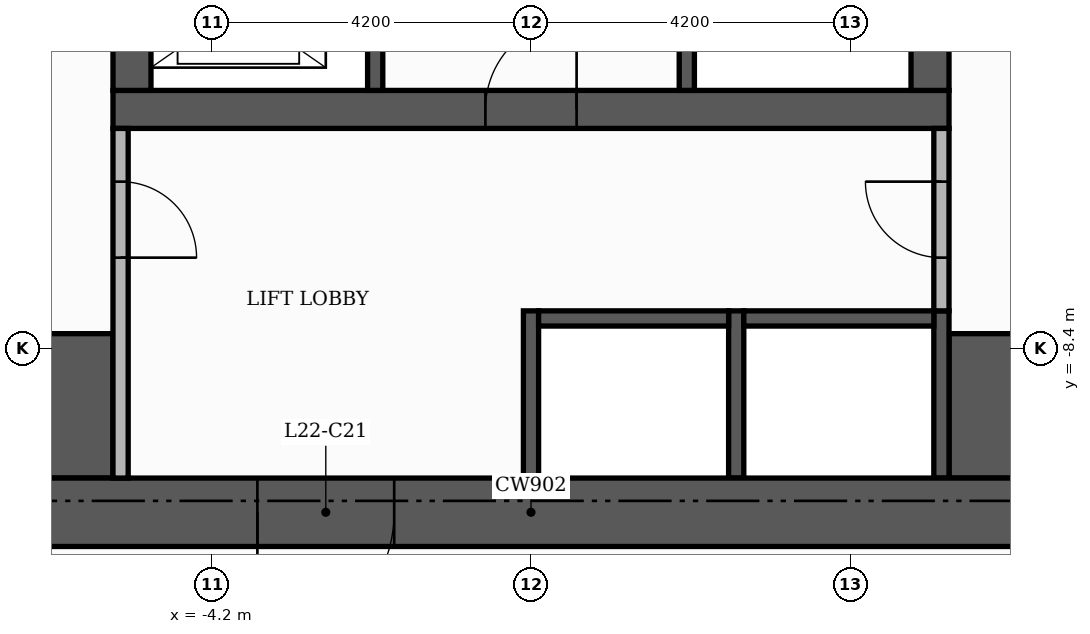
"""IFC4 building model, lengths in metres.
Left out: names, types, materials, properties, quantities, classifications, styles, units other than length and angle.
Written with IfcOpenShell. Run it as: python <this file> out.ifc"""

import sys

from ifc_helpers import new_model, si_unit, direction, frame, frame_2d, origin, place, context, subcontext, project, spatial, rectangle, extrude, element, fill, save


model = new_model("IFC4")
c1 = context("Model", 3, precision=1e-05, world=origin(), true_north=direction((0.0, 1.0)))
c2 = subcontext(c1, "Body", "Model", "MODEL_VIEW")
j1 = project(units=[si_unit("LENGTHUNIT", "METRE"), si_unit("PLANEANGLEUNIT", "RADIAN")], contexts=[c1])
p1 = place(None, origin())
s1 = spatial("IfcSite", under=j1, at=p1, CompositionType="ELEMENT")
p2 = place(p1, origin())
s2 = spatial("IfcBuilding", under=s1, at=p2, CompositionType="ELEMENT")
p3 = place(p2, frame((0.0, 0.0, 94.8)))
s3 = spatial("IfcBuildingStorey", under=s2, at=p3, CompositionType="ELEMENT", Elevation=94.8)
p4 = place(p3, frame((-5.5, -5.25, 0.0), z_axis=(0.0, 0.0, 1.0), x_axis=(1.0, 0.0, 0.0)))
e1 = element("IfcWall", 1, at=p4, inside=s3, PredefinedType="SHEAR", context=c2, shape_type="SweptSolid", body=[
    extrude(rectangle(XDim=11.0, YDim=0.5, at=frame_2d((5.5, 0.0))), origin(), (0.0, 0.0, 1.0), 3.48),
])
p5 = place(p4, frame((4.9, 0.0, 0.0)))
e2 = element("IfcOpeningElement", 2, at=p5, cuts=e1, PredefinedType="OPENING", context=c2, shape_type="SweptSolid", body=[
    extrude(rectangle(XDim=1.2, YDim=2.1, at=frame_2d((0.6, 1.05))), frame((0.0, 0.26, 0.0), z_axis=(0.0, -1.0, 0.0), x_axis=(1.0, 0.0, 0.0)), (0.0, 0.0, 1.0), 0.52),
])
for number, where, z_axis, x_axis in (
    (3, (-5.25, -5.0, 0.0), (0.0, 0.0, 1.0), (0.0, 1.0, 0.0)),
    (4, (5.25, -5.0, 0.0), (0.0, 0.0, 1.0), (0.0, 1.0, 0.0)),
):
    element("IfcWall", number, at=place(p3, frame(where, z_axis=z_axis, x_axis=x_axis)), inside=s3, PredefinedType="SHEAR", context=c2, shape_type="SweptSolid", body=[
        extrude(rectangle(XDim=10.5, YDim=0.5, at=frame_2d((5.25, 0.0))), origin(), (0.0, 0.0, 1.0), 3.48),
    ])
for number, where, z_axis, x_axis in (
    (5, (-10.1, -9.15, 0.0), (0.0, 0.0, 1.0), (1.0, 0.0, 0.0)),
    (6, (5.5, -9.15, 0.0), (0.0, 0.0, 1.0), (1.0, 0.0, 0.0)),
):
    element("IfcWall", number, at=place(p3, frame(where, z_axis=z_axis, x_axis=x_axis)), inside=s3, PredefinedType="SHEAR", context=c2, shape_type="SweptSolid", body=[
        extrude(rectangle(XDim=4.6, YDim=1.9, at=frame_2d((2.3, 0.0))), origin(), (0.0, 0.0, 1.0), 3.48),
    ])
p6 = place(p3, frame((2.05, -5.0, 0.0), z_axis=(0.0, 0.0, 1.0), x_axis=(0.0, 1.0, 0.0)))
e7 = element("IfcWall", 7, at=p6, inside=s3, PredefinedType="SHEAR", context=c2, shape_type="SweptSolid", body=[
    extrude(rectangle(XDim=6.6, YDim=0.2, at=frame_2d((3.3, 0.0))), origin(), (0.0, 0.0, 1.0), 3.48),
])
p7 = place(p6, frame((5.25, 0.0, 0.0)))
e8 = element("IfcOpeningElement", 8, at=p7, cuts=e7, PredefinedType="OPENING", context=c2, shape_type="SweptSolid", body=[
    extrude(rectangle(XDim=1.0, YDim=2.1, at=frame_2d((0.5, 1.05))), frame((0.0, 0.11, 0.0), z_axis=(0.0, -1.0, 0.0), x_axis=(1.0, 0.0, 0.0)), (0.0, 0.0, 1.0), 0.22),
])
for number, where, z_axis, x_axis in (
    (9, (0.0, -10.1, 0.0), (0.0, 0.0, 1.0), (0.0, 1.0, 0.0)),
    (10, (2.7, -10.1, 0.0), (0.0, 0.0, 1.0), (0.0, 1.0, 0.0)),
    (11, (5.4, -10.1, 0.0), (0.0, 0.0, 1.0), (0.0, 1.0, 0.0)),
):
    element("IfcWall", number, at=place(p3, frame(where, z_axis=z_axis, x_axis=x_axis)), inside=s3, PredefinedType="SHEAR", context=c2, shape_type="SweptSolid", body=[
        extrude(rectangle(XDim=2.2, YDim=0.2, at=frame_2d((1.1, 0.0))), origin(), (0.0, 0.0, 1.0), 3.48),
    ])
for number, where, z_axis, x_axis in (
    (12, (0.1, -8.0, 0.0), (0.0, 0.0, 1.0), (1.0, 0.0, 0.0)),
    (13, (2.8, -8.0, 0.0), (0.0, 0.0, 1.0), (1.0, 0.0, 0.0)),
):
    element("IfcWall", number, at=place(p3, frame(where, z_axis=z_axis, x_axis=x_axis)), inside=s3, PredefinedType="SHEAR", context=c2, shape_type="SweptSolid", body=[
        extrude(rectangle(XDim=2.5, YDim=0.2, at=frame_2d((1.25, 0.0))), origin(), (0.0, 0.0, 1.0), 3.48),
    ])
p8 = place(p3, frame((-2.05, -5.0, 0.0), z_axis=(0.0, 0.0, 1.0), x_axis=(0.0, 1.0, 0.0)))
e14 = element("IfcWall", 14, at=p8, inside=s3, PredefinedType="SHEAR", context=c2, shape_type="SweptSolid", body=[
    extrude(rectangle(XDim=3.4, YDim=0.2, at=frame_2d((1.7, 0.0))), origin(), (0.0, 0.0, 1.0), 3.48),
])
p9 = place(p8, frame((0.55, 0.0, 0.0)))
e15 = element("IfcOpeningElement", 15, at=p9, cuts=e14, PredefinedType="OPENING", context=c2, shape_type="SweptSolid", body=[
    extrude(rectangle(XDim=1.1, YDim=2.1, at=frame_2d((0.55, 1.05))), frame((0.0, 0.11, 0.0), z_axis=(0.0, -1.0, 0.0), x_axis=(1.0, 0.0, 0.0)), (0.0, 0.0, 1.0), 0.22),
])
p10 = place(p8, frame((2.45, 0.0, 0.0)))
e16 = element("IfcOpeningElement", 16, at=p10, cuts=e14, PredefinedType="OPENING", context=c2, shape_type="SweptSolid", body=[
    extrude(rectangle(XDim=0.8, YDim=2.1, at=frame_2d((0.4, 1.05))), frame((0.0, 0.11, 0.0), z_axis=(0.0, -1.0, 0.0), x_axis=(1.0, 0.0, 0.0)), (0.0, 0.0, 1.0), 0.22),
])
p11 = place(p3, frame((-11.0, -10.55, 0.0), z_axis=(0.0, 0.0, 1.0), x_axis=(1.0, 0.0, 0.0)))
e17 = element("IfcWall", 17, at=p11, inside=s3, PredefinedType="SHEAR", context=c2, shape_type="SweptSolid", body=[
    extrude(rectangle(XDim=22.0, YDim=0.9, at=frame_2d((11.0, 0.0))), origin(), (0.0, 0.0, 1.0), 3.48),
])
p12 = place(p11, frame((7.4, 0.0, 0.0)))
e18 = element("IfcOpeningElement", 18, at=p12, cuts=e17, PredefinedType="OPENING", context=c2, shape_type="SweptSolid", body=[
    extrude(rectangle(XDim=1.8, YDim=2.2, at=frame_2d((0.9, 1.1))), frame((0.0, 0.46, 0.0), z_axis=(0.0, -1.0, 0.0), x_axis=(1.0, 0.0, 0.0)), (0.0, 0.0, 1.0), 0.92),
])
p13 = place(p3, frame((-5.4, -10.1, 0.0), z_axis=(0.0, 0.0, 1.0), x_axis=(0.0, 1.0, 0.0)))
e19 = element("IfcWall", 19, at=p13, inside=s3, PredefinedType="PARTITIONING", context=c2, shape_type="SweptSolid", body=[
    extrude(rectangle(XDim=4.6, YDim=0.2, at=frame_2d((2.3, 0.0))), origin(), (0.0, 0.0, 1.0), 3.48),
])
p14 = place(p13, frame((2.9, 0.0, 0.0)))
e20 = element("IfcOpeningElement", 20, at=p14, cuts=e19, PredefinedType="OPENING", context=c2, shape_type="SweptSolid", body=[
    extrude(rectangle(XDim=1.0, YDim=2.1, at=frame_2d((0.5, 1.05))), frame((0.0, 0.11, 0.0), z_axis=(0.0, -1.0, 0.0), x_axis=(1.0, 0.0, 0.0)), (0.0, 0.0, 1.0), 0.22),
])
p15 = place(p3, frame((5.4, -7.9, 0.0), z_axis=(0.0, 0.0, 1.0), x_axis=(0.0, 1.0, 0.0)))
e21 = element("IfcWall", 21, at=p15, inside=s3, PredefinedType="PARTITIONING", context=c2, shape_type="SweptSolid", body=[
    extrude(rectangle(XDim=2.4, YDim=0.2, at=frame_2d((1.2, 0.0))), origin(), (0.0, 0.0, 1.0), 3.48),
])
p16 = place(p15, frame((0.7, 0.0, 0.0)))
e22 = element("IfcOpeningElement", 22, at=p16, cuts=e21, PredefinedType="OPENING", context=c2, shape_type="SweptSolid", body=[
    extrude(rectangle(XDim=1.0, YDim=2.1, at=frame_2d((0.5, 1.05))), frame((0.0, 0.11, 0.0), z_axis=(0.0, -1.0, 0.0), x_axis=(1.0, 0.0, 0.0)), (0.0, 0.0, 1.0), 0.22),
])
p17 = place(p5, origin())
e23 = element("IfcDoor", 23, at=p17, inside=s3, OperationType="SINGLE_SWING_RIGHT", PredefinedType="DOOR", context=c2, shape_type="SweptSolid", body=[
    extrude(rectangle(XDim=1.2, YDim=2.1, at=frame_2d((0.6, 1.05))), frame((0.0, 0.025, 0.0), z_axis=(0.0, -1.0, 0.0), x_axis=(1.0, 0.0, 0.0)), (0.0, 0.0, 1.0), 0.05),
])
fill(e2, e23)
p18 = place(p14, frame((1.0, 0.0, 0.0), z_axis=(0.0, 0.0, 1.0), x_axis=(-1.0, 0.0, 0.0)))
e24 = element("IfcDoor", 24, at=p18, inside=s3, OperationType="SINGLE_SWING_LEFT", PredefinedType="DOOR", context=c2, shape_type="SweptSolid", body=[
    extrude(rectangle(XDim=1.0, YDim=2.1, at=frame_2d((0.5, 1.05))), frame((0.0, 0.025, 0.0), z_axis=(0.0, -1.0, 0.0), x_axis=(1.0, 0.0, 0.0)), (0.0, 0.0, 1.0), 0.05),
])
fill(e20, e24)
p19 = place(p16, origin())
e25 = element("IfcDoor", 25, at=p19, inside=s3, OperationType="SINGLE_SWING_RIGHT", PredefinedType="DOOR", context=c2, shape_type="SweptSolid", body=[
    extrude(rectangle(XDim=1.0, YDim=2.1, at=frame_2d((0.5, 1.05))), frame((0.0, 0.025, 0.0), z_axis=(0.0, -1.0, 0.0), x_axis=(1.0, 0.0, 0.0)), (0.0, 0.0, 1.0), 0.05),
])
fill(e22, e25)
p20 = place(p12, frame((1.8, 0.0, 0.0), z_axis=(0.0, 0.0, 1.0), x_axis=(-1.0, 0.0, 0.0)))
e26 = element("IfcDoor", 26, at=p20, inside=s3, OperationType="DOUBLE_DOOR_SINGLE_SWING", PredefinedType="DOOR", context=c2, shape_type="SweptSolid", body=[
    extrude(rectangle(XDim=1.8, YDim=2.2, at=frame_2d((0.9, 1.1))), frame((0.0, 0.025, 0.0), z_axis=(0.0, -1.0, 0.0), x_axis=(1.0, 0.0, 0.0)), (0.0, 0.0, 1.0), 0.05),
])
fill(e18, e26)
save(model, sys.argv[1])
